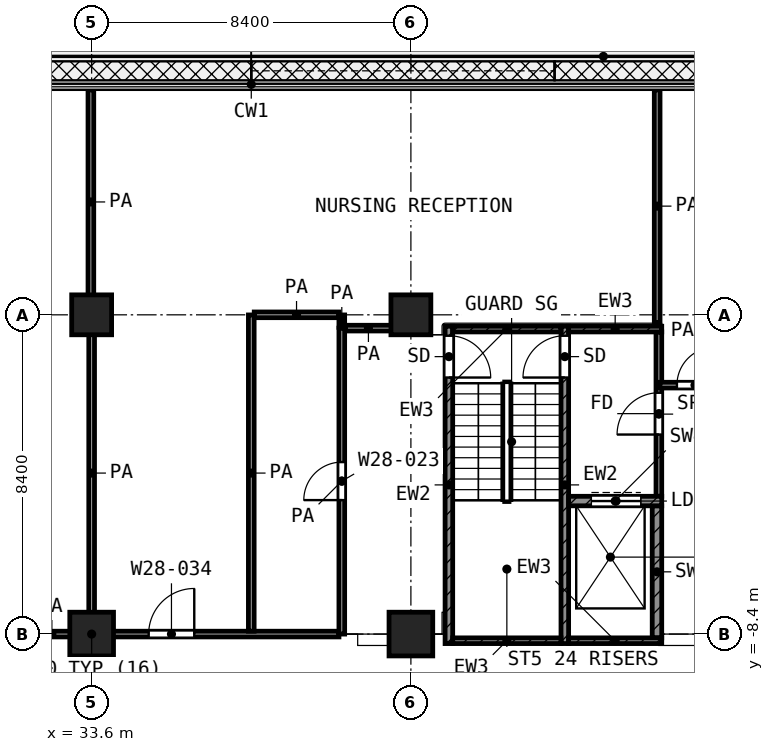
"""IFC4 building model, lengths in metres.
Left out: names, types, materials, properties, quantities, classifications, styles, units other than length and angle.
Written with IfcOpenShell. Run it as: python <this file> out.ifc"""

import sys

from ifc_helpers import new_model, si_unit, direction, frame, frame_2d, origin, origin_2d, place, context, subcontext, project, spatial, rectangle, extrude, element, fill, save


model = new_model("IFC4")
c1 = context("Model", 3, precision=1e-05, world=origin(), true_north=direction((0.0, 1.0)))
c2 = subcontext(c1, "Body", "Model", "MODEL_VIEW")
j1 = project(units=[si_unit("LENGTHUNIT", "METRE"), si_unit("PLANEANGLEUNIT", "RADIAN")], contexts=[c1])
p1 = place(None, origin())
s1 = spatial("IfcSite", under=j1, at=p1, CompositionType="ELEMENT")
p2 = place(p1, origin())
s2 = spatial("IfcBuilding", under=s1, at=p2, CompositionType="ELEMENT")
p3 = place(p2, frame((0.0, 0.0, 124.0)))
s3 = spatial("IfcBuildingStorey", under=s2, at=p3, CompositionType="ELEMENT", Elevation=124.0)
for number, where, z_axis, x_axis in (
    (1, (33.6, 0.0, 0.0), (0.0, 0.0, 1.0), (1.0, 0.0, 0.0)),
    (2, (42.0, 0.0, 0.0), (0.0, 0.0, 1.0), (1.0, 0.0, 0.0)),
):
    element("IfcColumn", number, at=place(p3, frame(where, z_axis=z_axis, x_axis=x_axis)), inside=s3, PredefinedType="COLUMN", context=c2, shape_type="SweptSolid", body=[
        extrude(rectangle(XDim=1.05, YDim=1.05, at=origin_2d()), origin(), (0.0, 0.0, 1.0), 4.2),
    ])
for number, where, z_axis, x_axis in (
    (3, (33.6, -8.4, 0.0), (0.0, 0.0, 1.0), (1.0, 0.0, 0.0)),
    (4, (42.0, -8.4, 0.0), (0.0, 0.0, 1.0), (1.0, 0.0, 0.0)),
):
    element("IfcColumn", number, at=place(p3, frame(where, z_axis=z_axis, x_axis=x_axis)), inside=s3, PredefinedType="COLUMN", context=c2, shape_type="SweptSolid", body=[
        extrude(rectangle(XDim=1.15, YDim=1.15, at=origin_2d()), origin(), (0.0, 0.0, 1.0), 4.2),
    ])
p4 = place(p3, frame((43.0, -8.65, 0.0), z_axis=(0.0, 0.0, 1.0), x_axis=(0.0, 1.0, 0.0)))
e5 = element("IfcWall", 5, at=p4, inside=s3, PredefinedType="SHEAR", context=c2, shape_type="SweptSolid", body=[
    extrude(rectangle(XDim=8.35, YDim=0.2, at=frame_2d((4.175, 0.0))), origin(), (0.0, 0.0, 1.0), 3.6),
])
p5 = place(p4, frame((7.0, 0.0, 0.0)))
e6 = element("IfcOpeningElement", 6, at=p5, cuts=e5, PredefinedType="OPENING", context=c2, shape_type="SweptSolid", body=[
    extrude(rectangle(XDim=1.1, YDim=2.1, at=frame_2d((0.55, 1.05))), frame((0.0, 0.11, 0.0), z_axis=(0.0, -1.0, 0.0), x_axis=(1.0, 0.0, 0.0)), (0.0, 0.0, 1.0), 0.22),
])
p6 = place(p3, frame((46.05, -8.65, 0.0), z_axis=(0.0, 0.0, 1.0), x_axis=(0.0, 1.0, 0.0)))
e7 = element("IfcWall", 7, at=p6, inside=s3, PredefinedType="SHEAR", context=c2, shape_type="SweptSolid", body=[
    extrude(rectangle(XDim=8.35, YDim=0.2, at=frame_2d((4.175, 0.0))), origin(), (0.0, 0.0, 1.0), 3.6),
])
p7 = place(p6, frame((7.0, 0.0, 0.0)))
e8 = element("IfcOpeningElement", 8, at=p7, cuts=e7, PredefinedType="OPENING", context=c2, shape_type="SweptSolid", body=[
    extrude(rectangle(XDim=1.1, YDim=2.1, at=frame_2d((0.55, 1.05))), frame((0.0, 0.11, 0.0), z_axis=(0.0, -1.0, 0.0), x_axis=(1.0, 0.0, 0.0)), (0.0, 0.0, 1.0), 0.22),
])
p8 = place(p3, frame((43.1, -0.375, 0.0), z_axis=(0.0, 0.0, 1.0), x_axis=(1.0, 0.0, 0.0)))
e9 = element("IfcWall", 9, at=p8, inside=s3, PredefinedType="SHEAR", context=c2, shape_type="SweptSolid", body=[
    extrude(rectangle(XDim=2.85, YDim=0.15, at=frame_2d((1.425, 0.0))), origin(), (0.0, 0.0, 1.0), 3.6),
])
p9 = place(p3, frame((46.15, -0.375, 0.0), z_axis=(0.0, 0.0, 1.0), x_axis=(1.0, 0.0, 0.0)))
e10 = element("IfcWall", 10, at=p9, inside=s3, PredefinedType="SHEAR", context=c2, shape_type="SweptSolid", body=[
    extrude(rectangle(XDim=2.45, YDim=0.15, at=frame_2d((1.225, 0.0))), origin(), (0.0, 0.0, 1.0), 3.6),
])
p10 = place(p3, frame((43.1, -8.575, 0.0), z_axis=(0.0, 0.0, 1.0), x_axis=(1.0, 0.0, 0.0)))
e11 = element("IfcWall", 11, at=p10, inside=s3, PredefinedType="SHEAR", context=c2, shape_type="SweptSolid", body=[
    extrude(rectangle(XDim=2.85, YDim=0.15, at=frame_2d((1.425, 0.0))), origin(), (0.0, 0.0, 1.0), 3.6),
])
p11 = place(p3, frame((46.15, -8.575, 0.0), z_axis=(0.0, 0.0, 1.0), x_axis=(1.0, 0.0, 0.0)))
e12 = element("IfcWall", 12, at=p11, inside=s3, PredefinedType="SHEAR", context=c2, shape_type="SweptSolid", body=[
    extrude(rectangle(XDim=2.45, YDim=0.15, at=frame_2d((1.225, 0.0))), origin(), (0.0, 0.0, 1.0), 3.6),
])
p12 = place(p3, frame((46.15, -4.9, 0.0), z_axis=(0.0, 0.0, 1.0), x_axis=(1.0, 0.0, 0.0)))
e13 = element("IfcWall", 13, at=p12, inside=s3, PredefinedType="SHEAR", context=c2, shape_type="SweptSolid", body=[
    extrude(rectangle(XDim=2.45, YDim=0.25, at=frame_2d((1.225, 0.0))), origin(), (0.0, 0.0, 1.0), 3.6),
])
p13 = place(p12, frame((0.6, 0.0, 0.0)))
e14 = element("IfcOpeningElement", 14, at=p13, cuts=e13, PredefinedType="OPENING", context=c2, shape_type="SweptSolid", body=[
    extrude(rectangle(XDim=1.3, YDim=2.1, at=frame_2d((0.65, 1.05))), frame((0.0, 0.135, 0.0), z_axis=(0.0, -1.0, 0.0), x_axis=(1.0, 0.0, 0.0)), (0.0, 0.0, 1.0), 0.27),
])
p14 = place(p3, frame((48.475, -8.5, 0.0), z_axis=(0.0, 0.0, 1.0), x_axis=(0.0, 1.0, 0.0)))
e15 = element("IfcWall", 15, at=p14, inside=s3, PredefinedType="SHEAR", context=c2, shape_type="SweptSolid", body=[
    extrude(rectangle(XDim=3.475, YDim=0.25, at=frame_2d((1.738, 0.0))), origin(), (0.0, 0.0, 1.0), 3.6),
])
p15 = place(p3, frame((48.525, -4.775, 0.0), z_axis=(0.0, 0.0, 1.0), x_axis=(0.0, 1.0, 0.0)))
e16 = element("IfcWall", 16, at=p15, inside=s3, PredefinedType="PARTITIONING", context=c2, shape_type="SweptSolid", body=[
    extrude(rectangle(XDim=4.325, YDim=0.15, at=frame_2d((2.163, 0.0))), origin(), (0.0, 0.0, 1.0), 3.6),
])
p16 = place(p15, frame((1.625, 0.0, 0.0)))
e17 = element("IfcOpeningElement", 17, at=p16, cuts=e16, PredefinedType="OPENING", context=c2, shape_type="SweptSolid", body=[
    extrude(rectangle(XDim=1.1, YDim=2.1, at=frame_2d((0.55, 1.05))), frame((0.0, 0.085, 0.0), z_axis=(0.0, -1.0, 0.0), x_axis=(1.0, 0.0, 0.0)), (0.0, 0.0, 1.0), 0.17),
])
p17 = place(p3, frame((25.0, -8.4, 0.0), z_axis=(0.0, 0.0, 1.0), x_axis=(1.0, 0.0, 0.0)))
e18 = element("IfcWall", 18, at=p17, inside=s3, PredefinedType="PARTITIONING", context=c2, shape_type="SweptSolid", body=[
    extrude(rectangle(XDim=15.107, YDim=0.15, at=frame_2d((7.553, 0.0))), origin(), (0.0, 0.0, 1.0), 3.6),
])
p18 = place(p17, frame((3.9, 0.0, 0.0)))
e19 = element("IfcOpeningElement", 19, at=p18, cuts=e18, PredefinedType="OPENING", context=c2, shape_type="SweptSolid", body=[
    extrude(rectangle(XDim=1.0, YDim=2.1, at=frame_2d((0.5, 1.05))), frame((0.0, 0.085, 0.0), z_axis=(0.0, -1.0, 0.0), x_axis=(1.0, 0.0, 0.0)), (0.0, 0.0, 1.0), 0.17),
])
p19 = place(p17, frame((10.1, 0.0, 0.0)))
e20 = element("IfcOpeningElement", 20, at=p19, cuts=e18, PredefinedType="OPENING", context=c2, shape_type="SweptSolid", body=[
    extrude(rectangle(XDim=1.2, YDim=2.1, at=frame_2d((0.6, 1.05))), frame((0.0, 0.085, 0.0), z_axis=(0.0, -1.0, 0.0), x_axis=(1.0, 0.0, 0.0)), (0.0, 0.0, 1.0), 0.17),
])
p20 = place(p3, frame((48.55, -1.85, 0.0), z_axis=(0.0, 0.0, 1.0), x_axis=(1.0, 0.0, 0.0)))
e21 = element("IfcWall", 21, at=p20, inside=s3, PredefinedType="PARTITIONING", context=c2, shape_type="SweptSolid", body=[
    extrude(rectangle(XDim=1.85, YDim=0.15, at=frame_2d((0.925, 0.0))), origin(), (0.0, 0.0, 1.0), 3.6),
])
p21 = place(p20, frame((0.45, 0.0, 0.0)))
e22 = element("IfcOpeningElement", 22, at=p21, cuts=e21, PredefinedType="OPENING", context=c2, shape_type="SweptSolid", body=[
    extrude(rectangle(XDim=1.0, YDim=2.1, at=frame_2d((0.5, 1.05))), frame((0.0, 0.085, 0.0), z_axis=(0.0, -1.0, 0.0), x_axis=(1.0, 0.0, 0.0)), (0.0, 0.0, 1.0), 0.17),
])
p22 = place(p3, frame((40.277, -0.35, 0.0), z_axis=(0.0, 0.0, 1.0), x_axis=(1.0, 0.0, 0.0)))
e23 = element("IfcWall", 23, at=p22, inside=s3, PredefinedType="PARTITIONING", context=c2, shape_type="SweptSolid", body=[
    extrude(rectangle(XDim=1.211, YDim=0.15, at=frame_2d((0.605, 0.0))), origin(), (0.0, 0.0, 1.0), 3.6),
])
p23 = place(p3, frame((37.878, 0.0, 0.0), z_axis=(0.0, 0.0, 1.0), x_axis=(1.0, 0.0, 0.0)))
e24 = element("IfcWall", 24, at=p23, inside=s3, PredefinedType="PARTITIONING", context=c2, shape_type="SweptSolid", body=[
    extrude(rectangle(XDim=2.226, YDim=0.15, at=frame_2d((1.113, 0.0))), origin(), (0.0, 0.0, 1.0), 3.6),
])
p24 = place(p3, frame((33.58, 0.02, 0.0), z_axis=(0.0, 0.0, 1.0), x_axis=(0.0, 1.0, 0.0)))
e25 = element("IfcWall", 25, at=p24, inside=s3, PredefinedType="PARTITIONING", context=c2, shape_type="SweptSolid", body=[
    extrude(rectangle(XDim=5.9, YDim=0.15, at=frame_2d((2.95, 0.0))), origin(), (0.0, 0.0, 1.0), 3.6),
])
for number, where, z_axis, x_axis in (
    (26, (33.6, -8.325, 0.0), (0.0, 0.0, 1.0), (0.0, 1.0, 0.0)),
    (27, (37.8, -8.325, 0.0), (0.0, 0.0, 1.0), (0.0, 1.0, 0.0)),
):
    element("IfcWall", number, at=place(p3, frame(where, z_axis=z_axis, x_axis=x_axis)), inside=s3, PredefinedType="PARTITIONING", context=c2, shape_type="SweptSolid", body=[
        extrude(rectangle(XDim=8.322, YDim=0.15, at=frame_2d((4.161, 0.0))), origin(), (0.0, 0.0, 1.0), 3.6),
    ])
p25 = place(p3, frame((40.182, -8.4, 0.0), z_axis=(0.0, 0.0, 1.0), x_axis=(0.0, 1.0, 0.0)))
e28 = element("IfcWall", 28, at=p25, inside=s3, PredefinedType="PARTITIONING", context=c2, shape_type="SweptSolid", body=[
    extrude(rectangle(XDim=8.05, YDim=0.15, at=frame_2d((4.025, 0.0))), origin(), (0.0, 0.0, 1.0), 3.6),
])
p26 = place(p25, frame((3.525, 0.0, 0.0)))
e29 = element("IfcOpeningElement", 29, at=p26, cuts=e28, PredefinedType="OPENING", context=c2, shape_type="SweptSolid", body=[
    extrude(rectangle(XDim=1.0, YDim=2.1, at=frame_2d((0.5, 1.05))), frame((0.0, 0.085, 0.0), z_axis=(0.0, -1.0, 0.0), x_axis=(1.0, 0.0, 0.0)), (0.0, 0.0, 1.0), 0.17),
])
p27 = place(p3, frame((40.182, -0.33, 0.0), z_axis=(0.0, 0.0, 1.0), x_axis=(0.0, 1.0, 0.0)))
e30 = element("IfcWall", 30, at=p27, inside=s3, PredefinedType="PARTITIONING", context=c2, shape_type="SweptSolid", body=[
    extrude(rectangle(XDim=0.327, YDim=0.15, at=frame_2d((0.164, 0.0))), origin(), (0.0, 0.0, 1.0), 3.6),
])
p28 = place(p3, frame((48.48, -0.2, 0.0), z_axis=(0.0, 0.0, 1.0), x_axis=(0.0, 1.0, 0.0)))
e31 = element("IfcWall", 31, at=p28, inside=s3, PredefinedType="PARTITIONING", context=c2, shape_type="SweptSolid", body=[
    extrude(rectangle(XDim=6.12, YDim=0.15, at=frame_2d((3.06, 0.0))), origin(), (0.0, 0.0, 1.0), 3.6),
])
p29 = place(p5, frame((1.1, 0.0, 0.0), z_axis=(0.0, 0.0, 1.0), x_axis=(-1.0, 0.0, 0.0)))
e32 = element("IfcDoor", 32, at=p29, inside=s3, OperationType="SINGLE_SWING_LEFT", PredefinedType="DOOR", context=c2, shape_type="SweptSolid", body=[
    extrude(rectangle(XDim=1.1, YDim=2.1, at=frame_2d((0.55, 1.05))), frame((0.0, 0.025, 0.0), z_axis=(0.0, -1.0, 0.0), x_axis=(1.0, 0.0, 0.0)), (0.0, 0.0, 1.0), 0.05),
])
fill(e6, e32)
p30 = place(p7, origin())
e33 = element("IfcDoor", 33, at=p30, inside=s3, OperationType="SINGLE_SWING_LEFT", PredefinedType="DOOR", context=c2, shape_type="SweptSolid", body=[
    extrude(rectangle(XDim=1.1, YDim=2.1, at=frame_2d((0.55, 1.05))), frame((0.0, 0.025, 0.0), z_axis=(0.0, -1.0, 0.0), x_axis=(1.0, 0.0, 0.0)), (0.0, 0.0, 1.0), 0.05),
])
fill(e8, e33)
p31 = place(p13, origin())
e34 = element("IfcDoor", 34, at=p31, inside=s3, OperationType="DOUBLE_DOOR_SLIDING", PredefinedType="DOOR", context=c2, shape_type="SweptSolid", body=[
    extrude(rectangle(XDim=1.3, YDim=2.1, at=frame_2d((0.65, 1.05))), frame((0.0, 0.025, 0.0), z_axis=(0.0, -1.0, 0.0), x_axis=(1.0, 0.0, 0.0)), (0.0, 0.0, 1.0), 0.05),
])
fill(e14, e34)
p32 = place(p16, origin())
e35 = element("IfcDoor", 35, at=p32, inside=s3, OperationType="SINGLE_SWING_LEFT", PredefinedType="DOOR", context=c2, shape_type="SweptSolid", body=[
    extrude(rectangle(XDim=1.1, YDim=2.1, at=frame_2d((0.55, 1.05))), frame((0.0, 0.025, 0.0), z_axis=(0.0, -1.0, 0.0), x_axis=(1.0, 0.0, 0.0)), (0.0, 0.0, 1.0), 0.05),
])
fill(e17, e35)
p33 = place(p19, origin())
e36 = element("IfcDoor", 36, at=p33, inside=s3, OperationType="SINGLE_SWING_RIGHT", PredefinedType="DOOR", context=c2, shape_type="SweptSolid", body=[
    extrude(rectangle(XDim=1.2, YDim=2.1, at=frame_2d((0.6, 1.05))), frame((0.0, 0.025, 0.0), z_axis=(0.0, -1.0, 0.0), x_axis=(1.0, 0.0, 0.0)), (0.0, 0.0, 1.0), 0.05),
])
fill(e20, e36)
p34 = place(p26, origin())
e37 = element("IfcDoor", 37, at=p34, inside=s3, OperationType="SINGLE_SWING_LEFT", PredefinedType="DOOR", context=c2, shape_type="SweptSolid", body=[
    extrude(rectangle(XDim=1.0, YDim=2.1, at=frame_2d((0.5, 1.05))), frame((0.0, 0.025, 0.0), z_axis=(0.0, -1.0, 0.0), x_axis=(1.0, 0.0, 0.0)), (0.0, 0.0, 1.0), 0.05),
])
fill(e29, e37)
p35 = place(p21, origin())
e38 = element("IfcDoor", 38, at=p35, inside=s3, OperationType="SINGLE_SWING_RIGHT", PredefinedType="DOOR", context=c2, shape_type="SweptSolid", body=[
    extrude(rectangle(XDim=1.0, YDim=2.1, at=frame_2d((0.5, 1.05))), frame((0.0, 0.025, 0.0), z_axis=(0.0, -1.0, 0.0), x_axis=(1.0, 0.0, 0.0)), (0.0, 0.0, 1.0), 0.05),
])
fill(e22, e38)
save(model, sys.argv[1])
